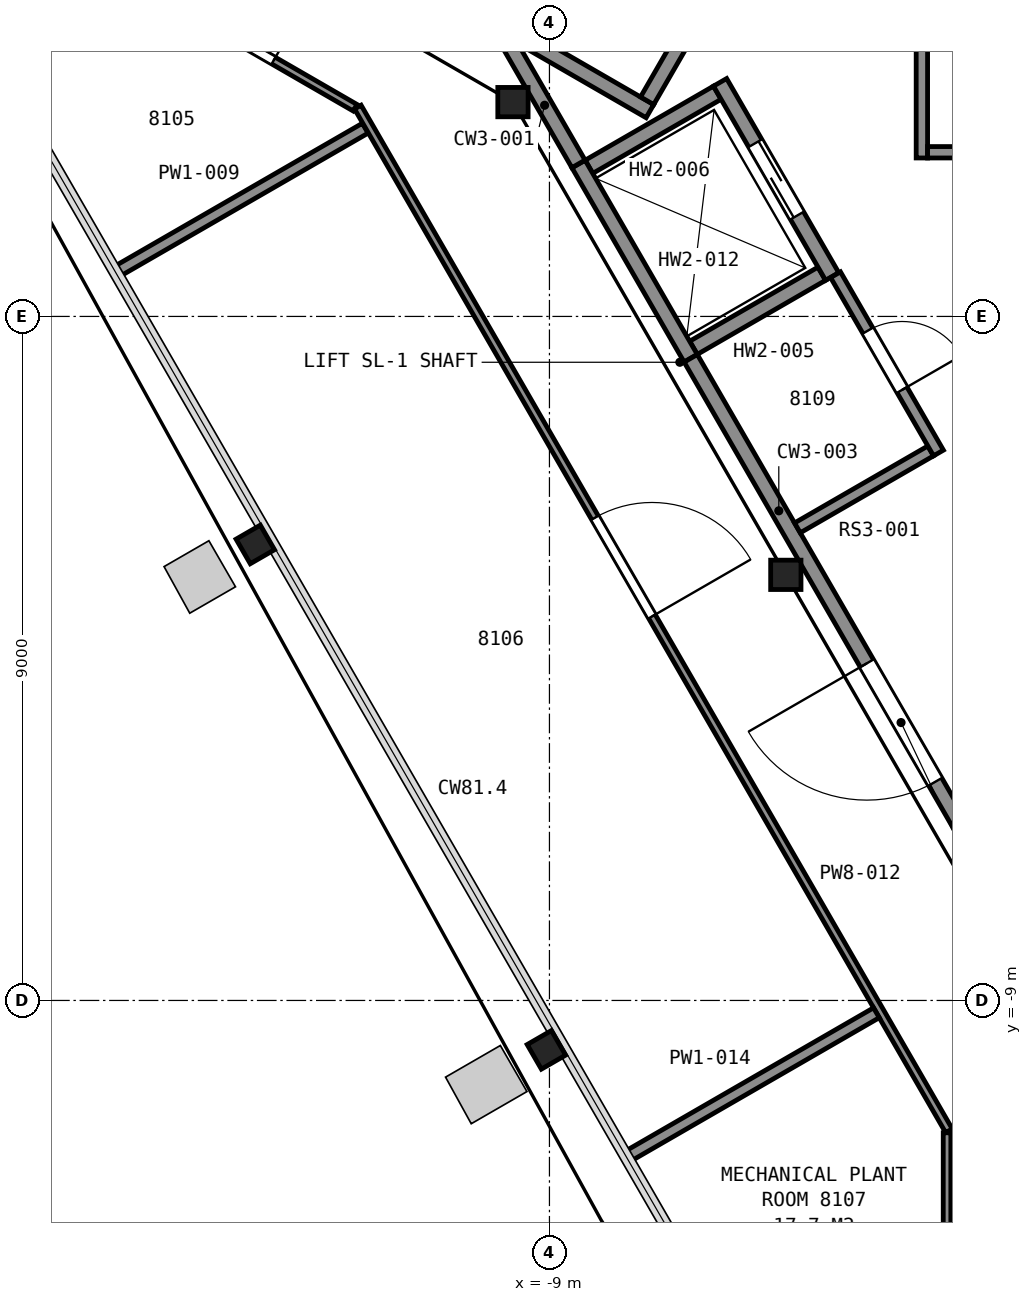
"""IFC4 building model, lengths in metres.
Left out: names, types, materials, properties, quantities, classifications, styles, units other than length and angle.
Written with IfcOpenShell. Run it as: python <this file> out.ifc"""

import sys

from ifc_helpers import new_model, si_unit, direction, frame, frame_2d, origin, origin_2d, place, context, subcontext, project, spatial, rectangle, i_section, extrude, element, fill, save


model = new_model("IFC4")
c1 = context("Model", 3, precision=1e-05, world=origin(), true_north=direction((0.0, 1.0)))
c2 = subcontext(c1, "Body", "Model", "MODEL_VIEW")
j1 = project(units=[si_unit("LENGTHUNIT", "METRE"), si_unit("PLANEANGLEUNIT", "RADIAN")], contexts=[c1])
p1 = place(None, origin())
s1 = spatial("IfcSite", under=j1, at=p1, CompositionType="ELEMENT")
p2 = place(p1, origin())
s2 = spatial("IfcBuilding", under=s1, at=p2, CompositionType="ELEMENT")
p3 = place(p2, frame((0.0, 0.0, 321.0)))
s3 = spatial("IfcBuildingStorey", under=s2, at=p3, CompositionType="ELEMENT", Elevation=321.0)
for number, where, z_axis, x_axis in (
    (1, (-12.87, -3.0, 0.0), (0.0, 0.0, 1.0), (-0.5, 0.866, 0.0)),
    (2, (-9.04, -9.65, 0.0), (0.0, 0.0, 1.0), (-0.5, 0.866, 0.0)),
):
    element("IfcColumn", number, at=place(p3, frame(where, z_axis=z_axis, x_axis=x_axis)), inside=s3, PredefinedType="COLUMN", context=c2, shape_type="SweptSolid", body=[
        extrude(i_section(OverallWidth=0.373, OverallDepth=0.368, WebThickness=0.015, FlangeThickness=0.024, FilletRadius=0.015, at=origin_2d()), origin(), (0.0, 0.0, 1.0), 4.2),
    ])
for number, where, z_axis, x_axis in (
    (3, (-9.48, 2.82, 0.0), (0.0, 0.0, 1.0), (1.0, 0.0, 0.0)),
    (4, (-5.89, -3.4, 0.0), (0.0, 0.0, 1.0), (1.0, 0.0, 0.0)),
):
    element("IfcColumn", number, at=place(p3, frame(where, z_axis=z_axis, x_axis=x_axis)), inside=s3, PredefinedType="COLUMN", context=c2, shape_type="SweptSolid", body=[
        extrude(i_section(OverallWidth=0.399, OverallDepth=0.386, WebThickness=0.021, FlangeThickness=0.033, FilletRadius=0.015, at=origin_2d()), origin(), (0.0, 0.0, 1.0), 4.2),
    ])
p4 = place(p3, frame((-7.678, 2.701, 0.0), z_axis=(0.0, 0.0, 1.0), x_axis=(-0.866018442252, 0.500012057535, 0.0)))
e5 = element("IfcWall", 5, at=p4, inside=s3, PredefinedType="PARTITIONING", context=c2, shape_type="SweptSolid", body=[
    extrude(rectangle(XDim=7.2, YDim=0.2, at=frame_2d((3.6, 0.0))), origin(), (0.0, 0.0, 1.0), 3.95),
])
p5 = place(p3, frame((-6.315, 5.262, 0.0), z_axis=(0.0, 0.0, 1.0), x_axis=(-0.500049511043, -0.865996816683, 0.0)))
e6 = element("IfcWall", 6, at=p5, inside=s3, PredefinedType="PARTITIONING", context=c2, shape_type="SweptSolid", body=[
    extrude(rectangle(XDim=2.8, YDim=0.2, at=frame_2d((1.4, 0.0))), origin(), (0.0, 0.0, 1.0), 3.95),
])
for number, where, z_axis, x_axis in (
    (7, (-7.105, -0.413, 0.0), (0.0, 0.0, 1.0), (0.866, 0.5, 0.0)),
    (8, (-8.48, 1.969, 0.0), (0.0, 0.0, 1.0), (0.866, 0.5, 0.0)),
):
    element("IfcWall", number, at=place(p3, frame(where, z_axis=z_axis, x_axis=x_axis)), inside=s3, PredefinedType="PARTITIONING", context=c2, shape_type="SweptSolid", body=[
        extrude(rectangle(XDim=1.95, YDim=0.2, at=frame_2d((0.975, 0.0))), origin(), (0.0, 0.0, 1.0), 4.2),
    ])
p6 = place(p3, frame((-5.28, 0.525, 0.0), z_axis=(0.0, 0.0, 1.0), x_axis=(-0.500037662692, 0.866003658127, 0.0)))
e9 = element("IfcWall", 9, at=p6, inside=s3, PredefinedType="PARTITIONING", context=c2, shape_type="SweptSolid", body=[
    extrude(rectangle(XDim=2.95, YDim=0.2, at=frame_2d((1.475, 0.0))), origin(), (0.0, 0.0, 1.0), 4.2),
])
p7 = place(p6, frame((0.925, 0.0, 0.0)))
e10 = element("IfcOpeningElement", 10, at=p7, cuts=e9, PredefinedType="OPENING", context=c2, shape_type="SweptSolid", body=[
    extrude(rectangle(XDim=1.1, YDim=2.1, at=frame_2d((0.55, 1.05))), frame((0.0, 0.11, 0.0), z_axis=(0.0, -1.0, 0.0), x_axis=(1.0, 0.0, 0.0)), (0.0, 0.0, 1.0), 0.22),
])
p8 = place(p3, frame((-7.142, -0.55, 0.0), z_axis=(0.0, 0.0, 1.0), x_axis=(-0.49997559174, 0.866039495442, 0.0)))
e11 = element("IfcWall", 11, at=p8, inside=s3, PredefinedType="PARTITIONING", context=c2, shape_type="SweptSolid", body=[
    extrude(rectangle(XDim=2.95, YDim=0.2, at=frame_2d((1.475, 0.0))), origin(), (0.0, 0.0, 1.0), 4.2),
])
p9 = place(p3, frame((-9.509, 3.551, 0.0), z_axis=(0.0, 0.0, 1.0), x_axis=(0.499999136801, -0.866025902152, 0.0)))
e12 = element("IfcWall", 12, at=p9, inside=s3, PredefinedType="PARTITIONING", context=c2, shape_type="SweptSolid", body=[
    extrude(rectangle(XDim=1.782, YDim=0.2, at=frame_2d((0.891, 0.0))), origin(), (0.0, 0.0, 1.0), 3.95),
])
p10 = place(p3, frame((-7.141, -0.551, 0.0), z_axis=(0.0, 0.0, 1.0), x_axis=(0.499992795234, -0.866029563418, 0.0)))
e13 = element("IfcWall", 13, at=p10, inside=s3, PredefinedType="PARTITIONING", context=c2, shape_type="SweptSolid", body=[
    extrude(rectangle(XDim=9.198, YDim=0.2, at=frame_2d((4.599, 0.0))), origin(), (0.0, 0.0, 1.0), 3.95),
])
p11 = place(p10, frame((4.634, 0.0, 0.0)))
e14 = element("IfcOpeningElement", 14, at=p11, cuts=e13, PredefinedType="OPENING", context=c2, shape_type="SweptSolid", body=[
    extrude(rectangle(XDim=1.8, YDim=2.1, at=frame_2d((0.9, 1.05))), frame((0.0, 0.11, 0.0), z_axis=(0.0, -1.0, 0.0), x_axis=(1.0, 0.0, 0.0)), (0.0, 0.0, 1.0), 0.22),
])
p12 = place(p3, frame((-5.737, -2.782, 0.0), z_axis=(0.0, 0.0, 1.0), x_axis=(0.866000843773, 0.500042536776, 0.0)))
e15 = element("IfcWall", 15, at=p12, inside=s3, PredefinedType="PARTITIONING", context=c2, shape_type="SweptSolid", body=[
    extrude(rectangle(XDim=2.025, YDim=0.15, at=frame_2d((1.012, 0.0))), origin(), (0.0, 0.0, 1.0), 3.95),
])
p13 = place(p3, frame((-3.882, -1.797, 0.0), z_axis=(0.0, 0.0, 1.0), x_axis=(-0.500016307898, 0.86601598821, 0.0)))
e16 = element("IfcWall", 16, at=p13, inside=s3, PredefinedType="PARTITIONING", context=c2, shape_type="SweptSolid", body=[
    extrude(rectangle(XDim=2.709, YDim=0.15, at=frame_2d((1.354, 0.0))), origin(), (0.0, 0.0, 1.0), 3.95),
])
p14 = place(p13, frame((0.959, 0.0, 0.0)))
e17 = element("IfcOpeningElement", 17, at=p14, cuts=e16, PredefinedType="OPENING", context=c2, shape_type="SweptSolid", body=[
    extrude(rectangle(XDim=0.9, YDim=2.1, at=frame_2d((0.45, 1.05))), frame((0.0, 0.085, 0.0), z_axis=(0.0, -1.0, 0.0), x_axis=(1.0, 0.0, 0.0)), (0.0, 0.0, 1.0), 0.17),
])
p15 = place(p3, frame((-4.1, 2.085, 0.0), z_axis=(0.0, 0.0, 1.0), x_axis=(0.0, 1.0, 0.0)))
e18 = element("IfcWall", 18, at=p15, inside=s3, PredefinedType="PARTITIONING", context=c2, shape_type="SweptSolid", body=[
    extrude(rectangle(XDim=4.23, YDim=0.15, at=frame_2d((2.115, 0.0))), origin(), (0.0, 0.0, 1.0), 3.95),
])
p16 = place(p15, frame((1.625, 0.0, 0.0)))
e19 = element("IfcOpeningElement", 19, at=p16, cuts=e18, PredefinedType="OPENING", context=c2, shape_type="SweptSolid", body=[
    extrude(rectangle(XDim=1.0, YDim=2.1, at=frame_2d((0.5, 1.05))), frame((0.0, 0.085, 0.0), z_axis=(0.0, -1.0, 0.0), x_axis=(1.0, 0.0, 0.0)), (0.0, 0.0, 1.0), 0.17),
])
p17 = place(p3, frame((-4.025, 2.16, 0.0), z_axis=(0.0, 0.0, 1.0), x_axis=(1.0, 0.0, 0.0)))
e20 = element("IfcWall", 20, at=p17, inside=s3, PredefinedType="PARTITIONING", context=c2, shape_type="SweptSolid", body=[
    extrude(rectangle(XDim=1.238, YDim=0.15, at=frame_2d((0.619, 0.0))), origin(), (0.0, 0.0, 1.0), 3.95),
])
p18 = place(p3, frame((-11.557, 2.746, 0.0), z_axis=(0.0, 0.0, 1.0), x_axis=(-0.866005840187, 0.500033883614, 0.0)))
e21 = element("IfcWall", 21, at=p18, inside=s3, PredefinedType="PARTITIONING", context=c2, shape_type="SweptSolid", body=[
    extrude(rectangle(XDim=4.139, YDim=0.1, at=frame_2d((2.07, 0.0))), origin(), (0.0, 0.0, 1.0), 3.297),
])
p19 = place(p18, frame((1.24, 0.0, 0.0)))
e22 = element("IfcOpeningElement", 22, at=p19, cuts=e21, PredefinedType="OPENING", context=c2, shape_type="SweptSolid", body=[
    extrude(rectangle(XDim=1.5, YDim=2.1, at=frame_2d((0.75, 1.05))), frame((0.0, 0.06, 0.0), z_axis=(0.0, -1.0, 0.0), x_axis=(1.0, 0.0, 0.0)), (0.0, 0.0, 1.0), 0.12),
])
p20 = place(p3, frame((-14.696, 0.588, 0.0), z_axis=(0.0, 0.0, 1.0), x_axis=(0.866115649152, 0.499843657852, 0.0)))
e23 = element("IfcWall", 23, at=p20, inside=s3, PredefinedType="PARTITIONING", context=c2, shape_type="SweptSolid", body=[
    extrude(rectangle(XDim=3.778, YDim=0.15, at=frame_2d((1.889, 0.0))), origin(), (0.0, 0.0, 1.0), 3.297),
])
p21 = place(p3, frame((-3.744, -10.714, 0.0), z_axis=(0.0, 0.0, 1.0), x_axis=(-0.500044034969, 0.86599997869, 0.0)))
e24 = element("IfcWall", 24, at=p21, inside=s3, PredefinedType="PARTITIONING", context=c2, shape_type="SweptSolid", body=[
    extrude(rectangle(XDim=15.553, YDim=0.1, at=frame_2d((7.776, 0.0))), origin(), (0.0, 0.0, 1.0), 3.297),
])
p22 = place(p21, frame((7.814, 0.0, 0.0)))
e25 = element("IfcOpeningElement", 25, at=p22, cuts=e24, PredefinedType="OPENING", context=c2, shape_type="SweptSolid", body=[
    extrude(rectangle(XDim=1.5, YDim=2.1, at=frame_2d((0.75, 1.05))), frame((0.0, 0.06, 0.0), z_axis=(0.0, -1.0, 0.0), x_axis=(1.0, 0.0, 0.0)), (0.0, 0.0, 1.0), 0.12),
])
p23 = place(p3, frame((-7.975, -11.054, 0.0), z_axis=(0.0, 0.0, 1.0), x_axis=(0.865998594852, 0.500046431558, 0.0)))
e26 = element("IfcWall", 26, at=p23, inside=s3, PredefinedType="PARTITIONING", context=c2, shape_type="SweptSolid", body=[
    extrude(rectangle(XDim=3.783, YDim=0.15, at=frame_2d((1.892, 0.0))), origin(), (0.0, 0.0, 1.0), 3.297),
])
p24 = place(p3, frame((-3.769, -18.253, 0.0), z_axis=(0.0, 0.0, 1.0), x_axis=(0.0, 1.0, 0.0)))
e27 = element("IfcWall", 27, at=p24, inside=s3, PredefinedType="PARTITIONING", context=c2, shape_type="SweptSolid", body=[
    extrude(rectangle(XDim=7.512, YDim=0.1, at=frame_2d((3.756, 0.0))), origin(), (0.0, 0.0, 1.0), 3.297),
])
p25 = place(p24, frame((3.184, 0.0, 0.0)))
e28 = element("IfcOpeningElement", 28, at=p25, cuts=e27, PredefinedType="OPENING", context=c2, shape_type="SweptSolid", body=[
    extrude(rectangle(XDim=1.5, YDim=2.1, at=frame_2d((0.75, 1.05))), frame((0.0, 0.06, 0.0), z_axis=(0.0, -1.0, 0.0), x_axis=(1.0, 0.0, 0.0)), (0.0, 0.0, 1.0), 0.12),
])
p26 = place(p7, origin())
e29 = element("IfcDoor", 29, at=p26, inside=s3, OperationType="SLIDING_TO_LEFT", PredefinedType="DOOR", context=c2, shape_type="SweptSolid", body=[
    extrude(rectangle(XDim=1.1, YDim=2.1, at=frame_2d((0.55, 1.05))), frame((0.0, 0.025, 0.0), z_axis=(0.0, -1.0, 0.0), x_axis=(1.0, 0.0, 0.0)), (0.0, 0.0, 1.0), 0.05),
])
fill(e10, e29)
p27 = place(p11, origin())
e30 = element("IfcDoor", 30, at=p27, inside=s3, OperationType="DOUBLE_DOOR_SINGLE_SWING", PredefinedType="DOOR", context=c2, shape_type="SweptSolid", body=[
    extrude(rectangle(XDim=1.8, YDim=2.1, at=frame_2d((0.9, 1.05))), frame((0.0, 0.025, 0.0), z_axis=(0.0, -1.0, 0.0), x_axis=(1.0, 0.0, 0.0)), (0.0, 0.0, 1.0), 0.05),
])
fill(e14, e30)
p28 = place(p14, origin())
e31 = element("IfcDoor", 31, at=p28, inside=s3, OperationType="SINGLE_SWING_LEFT", PredefinedType="DOOR", context=c2, shape_type="SweptSolid", body=[
    extrude(rectangle(XDim=0.9, YDim=2.1, at=frame_2d((0.45, 1.05))), frame((0.0, 0.025, 0.0), z_axis=(0.0, -1.0, 0.0), x_axis=(1.0, 0.0, 0.0)), (0.0, 0.0, 1.0), 0.05),
])
fill(e17, e31)
p29 = place(p19, origin())
e32 = element("IfcDoor", 32, at=p29, inside=s3, OperationType="DOUBLE_DOOR_SINGLE_SWING", PredefinedType="DOOR", context=c2, shape_type="SweptSolid", body=[
    extrude(rectangle(XDim=1.5, YDim=2.1, at=frame_2d((0.75, 1.05))), frame((0.0, 0.025, 0.0), z_axis=(0.0, -1.0, 0.0), x_axis=(1.0, 0.0, 0.0)), (0.0, 0.0, 1.0), 0.05),
])
fill(e22, e32)
p30 = place(p22, origin())
e33 = element("IfcDoor", 33, at=p30, inside=s3, OperationType="DOUBLE_DOOR_SINGLE_SWING", PredefinedType="DOOR", context=c2, shape_type="SweptSolid", body=[
    extrude(rectangle(XDim=1.5, YDim=2.1, at=frame_2d((0.75, 1.05))), frame((0.0, 0.025, 0.0), z_axis=(0.0, -1.0, 0.0), x_axis=(1.0, 0.0, 0.0)), (0.0, 0.0, 1.0), 0.05),
])
fill(e25, e33)
save(model, sys.argv[1])
